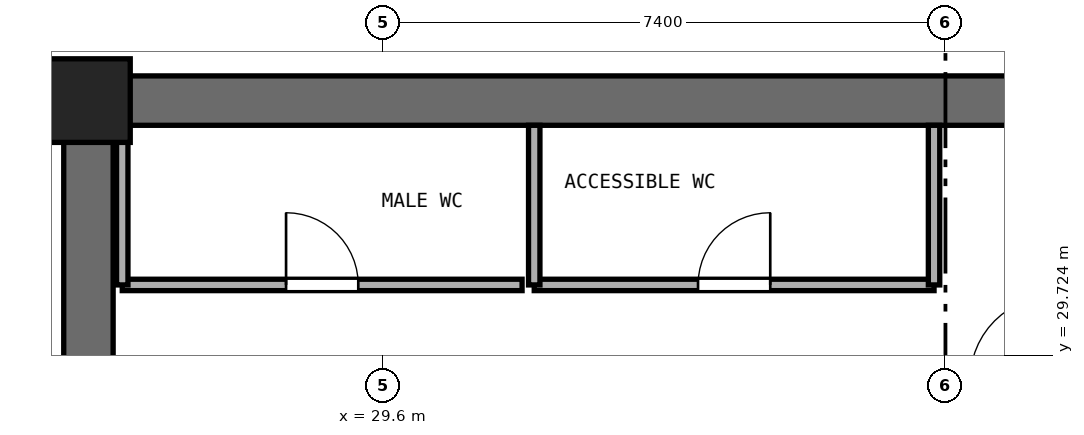
"""IFC4 building model, lengths in metres.
Left out: names, types, materials, properties, quantities, classifications, styles, units other than length and angle.
Written with IfcOpenShell. Run it as: python <this file> out.ifc"""

import sys

from ifc_helpers import new_model, si_unit, direction, frame, frame_2d, origin, origin_2d, place, context, subcontext, project, spatial, rectangle, extrude, element, fill, save


model = new_model("IFC4")
c1 = context("Model", 3, precision=1e-05, world=origin(), true_north=direction((0.0, 1.0)))
c2 = subcontext(c1, "Body", "Model", "MODEL_VIEW")
j1 = project(units=[si_unit("LENGTHUNIT", "METRE"), si_unit("PLANEANGLEUNIT", "RADIAN")], contexts=[c1])
p1 = place(None, origin())
s1 = spatial("IfcSite", under=j1, at=p1, CompositionType="ELEMENT")
p2 = place(p1, origin())
s2 = spatial("IfcBuilding", under=s1, at=p2, CompositionType="ELEMENT")
p3 = place(p2, frame((0.0, 0.0, 89.6)))
s3 = spatial("IfcBuildingStorey", under=s2, at=p3, CompositionType="ELEMENT", Elevation=89.6)
p4 = place(p3, frame((25.4, 33.075, 0.0), z_axis=(0.0, 0.0, 1.0), x_axis=(1.0, 0.0, 0.0)))
e1 = element("IfcWall", 1, at=p4, inside=s3, PredefinedType="SHEAR", context=c2, shape_type="SweptSolid", body=[
    extrude(rectangle(XDim=23.2, YDim=0.65, at=frame_2d((11.6, 0.0))), origin(), (0.0, 0.0, 1.0), 3.525),
])
p5 = place(p3, frame((25.725, 17.65, 0.0), z_axis=(0.0, 0.0, 1.0), x_axis=(0.0, 1.0, 0.0)))
e2 = element("IfcWall", 2, at=p5, inside=s3, PredefinedType="SHEAR", context=c2, shape_type="SweptSolid", body=[
    extrude(rectangle(XDim=15.1, YDim=0.65, at=frame_2d((7.55, 0.0))), origin(), (0.0, 0.0, 1.0), 3.525),
])
p6 = place(p5, frame((6.8, 0.0, 0.0)))
e3 = element("IfcOpeningElement", 3, at=p6, cuts=e2, PredefinedType="OPENING", context=c2, shape_type="SweptSolid", body=[
    extrude(rectangle(XDim=1.5, YDim=2.15, at=frame_2d((0.75, 1.075))), frame((0.0, 0.335, 0.0), z_axis=(0.0, -1.0, 0.0), x_axis=(1.0, 0.0, 0.0)), (0.0, 0.0, 1.0), 0.67),
])
p7 = place(p3, frame((25.725, 33.075, 0.0), z_axis=(0.0, 0.0, 1.0), x_axis=(1.0, 0.0, 0.0)))
e4 = element("IfcColumn", 4, at=p7, inside=s3, PredefinedType="PILASTER", context=c2, shape_type="SweptSolid", body=[
    extrude(rectangle(XDim=1.1, YDim=1.1, at=origin_2d()), origin(), (0.0, 0.0, 1.0), 3.8),
])
p8 = place(p3, frame((26.17, 30.65, 0.0), z_axis=(0.0, 0.0, 1.0), x_axis=(1.0, 0.0, 0.0)))
e5 = element("IfcWall", 5, at=p8, inside=s3, PredefinedType="PARTITIONING", context=c2, shape_type="SweptSolid", body=[
    extrude(rectangle(XDim=5.26, YDim=0.15, at=frame_2d((2.63, 0.0))), origin(), (0.0, 0.0, 1.0), 3.525),
])
p9 = place(p8, frame((2.155, 0.0, 0.0)))
e6 = element("IfcOpeningElement", 6, at=p9, cuts=e5, PredefinedType="OPENING", context=c2, shape_type="SweptSolid", body=[
    extrude(rectangle(XDim=0.95, YDim=2.1, at=frame_2d((0.475, 1.05))), frame((0.0, 0.085, 0.0), z_axis=(0.0, -1.0, 0.0), x_axis=(1.0, 0.0, 0.0)), (0.0, 0.0, 1.0), 0.17),
])
p10 = place(p3, frame((26.17, 30.65, 0.0), z_axis=(0.0, 0.0, 1.0), x_axis=(0.0, 1.0, 0.0)))
e7 = element("IfcWall", 7, at=p10, inside=s3, PredefinedType="PARTITIONING", context=c2, shape_type="SweptSolid", body=[
    extrude(rectangle(XDim=2.1, YDim=0.15, at=frame_2d((1.05, 0.0))), origin(), (0.0, 0.0, 1.0), 3.525),
])
p11 = place(p3, frame((31.59, 30.65, 0.0), z_axis=(0.0, 0.0, 1.0), x_axis=(1.0, 0.0, 0.0)))
e8 = element("IfcWall", 8, at=p11, inside=s3, PredefinedType="PARTITIONING", context=c2, shape_type="SweptSolid", body=[
    extrude(rectangle(XDim=5.26, YDim=0.15, at=frame_2d((2.63, 0.0))), origin(), (0.0, 0.0, 1.0), 3.525),
])
p12 = place(p11, frame((2.155, 0.0, 0.0)))
e9 = element("IfcOpeningElement", 9, at=p12, cuts=e8, PredefinedType="OPENING", context=c2, shape_type="SweptSolid", body=[
    extrude(rectangle(XDim=0.95, YDim=2.1, at=frame_2d((0.475, 1.05))), frame((0.0, 0.085, 0.0), z_axis=(0.0, -1.0, 0.0), x_axis=(1.0, 0.0, 0.0)), (0.0, 0.0, 1.0), 0.17),
])
for number, where, z_axis, x_axis in (
    (10, (31.59, 30.65, 0.0), (0.0, 0.0, 1.0), (0.0, 1.0, 0.0)),
    (11, (36.85, 30.65, 0.0), (0.0, 0.0, 1.0), (0.0, 1.0, 0.0)),
):
    element("IfcWall", number, at=place(p3, frame(where, z_axis=z_axis, x_axis=x_axis)), inside=s3, PredefinedType="PARTITIONING", context=c2, shape_type="SweptSolid", body=[
        extrude(rectangle(XDim=2.1, YDim=0.15, at=frame_2d((1.05, 0.0))), origin(), (0.0, 0.0, 1.0), 3.525),
    ])
p13 = place(p9, origin())
e12 = element("IfcDoor", 12, at=p13, inside=s3, OperationType="SINGLE_SWING_LEFT", PredefinedType="DOOR", context=c2, shape_type="SweptSolid", body=[
    extrude(rectangle(XDim=0.95, YDim=2.1, at=frame_2d((0.475, 1.05))), frame((0.0, 0.025, 0.0), z_axis=(0.0, -1.0, 0.0), x_axis=(1.0, 0.0, 0.0)), (0.0, 0.0, 1.0), 0.05),
])
fill(e6, e12)
p14 = place(p12, origin())
e13 = element("IfcDoor", 13, at=p14, inside=s3, OperationType="SINGLE_SWING_RIGHT", PredefinedType="DOOR", context=c2, shape_type="SweptSolid", body=[
    extrude(rectangle(XDim=0.95, YDim=2.1, at=frame_2d((0.475, 1.05))), frame((0.0, 0.025, 0.0), z_axis=(0.0, -1.0, 0.0), x_axis=(1.0, 0.0, 0.0)), (0.0, 0.0, 1.0), 0.05),
])
fill(e9, e13)
save(model, sys.argv[1])
